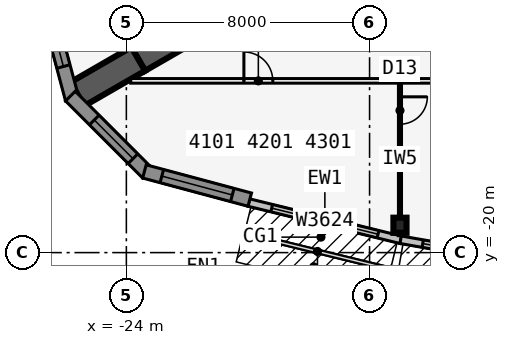
"""IFC4 building model, lengths in metres.
Left out: names, types, materials, properties, quantities, classifications, styles, units other than length and angle.
Written with IfcOpenShell. Run it as: python <this file> out.ifc"""

import sys

from ifc_helpers import new_model, si_unit, direction, frame, frame_2d, origin, origin_2d, place, context, subcontext, project, spatial, polyline, rectangle, i_section, outline, extrude, element, fill, save


model = new_model("IFC4")
c1 = context("Model", 3, precision=1e-05, world=origin(), true_north=direction((0.0, 1.0)))
c2 = subcontext(c1, "Body", "Model", "MODEL_VIEW")
j1 = project(units=[si_unit("LENGTHUNIT", "METRE"), si_unit("PLANEANGLEUNIT", "RADIAN")], contexts=[c1])
p1 = place(None, origin())
s1 = spatial("IfcSite", under=j1, at=p1, CompositionType="ELEMENT")
p2 = place(p1, origin())
s2 = spatial("IfcBuilding", under=s1, at=p2, CompositionType="ELEMENT")
p3 = place(p2, frame((0.0, 0.0, 155.5)))
s3 = spatial("IfcBuildingStorey", under=s2, at=p3, CompositionType="ELEMENT", Elevation=155.5)
for number, where, z_axis, x_axis in (
    (1, (-21.61, -12.477, 0.0), (0.0, 0.0, 1.0), (-0.866, -0.5, 0.0)),
    (2, (-23.61, -13.631, 0.0), (0.0, 0.0, 1.0), (-0.866, -0.5, 0.0)),
):
    element("IfcWall", number, at=place(p3, frame(where, z_axis=z_axis, x_axis=x_axis)), inside=s3, PredefinedType="SHEAR", context=c2, shape_type="SweptSolid", body=[
        extrude(rectangle(XDim=2.309, YDim=0.9, at=frame_2d((1.155, 0.0))), origin(), (0.0, 0.0, 1.0), 3.4),
    ])
p4 = place(p3, frame((-15.0, -19.1, 0.0), z_axis=(0.0, 0.0, 1.0), x_axis=(1.0, 0.0, 0.0)))
e3 = element("IfcColumn", 3, at=p4, inside=s3, PredefinedType="COLUMN", context=c2, shape_type="SweptSolid", body=[
    extrude(i_section(OverallWidth=0.432, OverallDepth=0.498, WebThickness=0.056, FlangeThickness=0.089, at=origin_2d()), origin(), (0.0, 0.0, 1.0), 3.4),
])
p5 = place(p3, frame((-19.97, -18.354, 0.0), z_axis=(0.0, 0.0, 1.0), x_axis=(0.971270024053, -0.237980126011, 0.0)))
e4 = element("IfcWall", 4, at=p5, inside=s3, PredefinedType="STANDARD", context=c2, shape_type="SweptSolid", body=[
    extrude(rectangle(XDim=5.148, YDim=0.25, at=frame_2d((2.574, 0.0))), origin(), (0.0, 0.0, 1.0), 3.235),
])
p6 = place(p5, frame((0.774, 0.0, 0.45)))
e5 = element("IfcOpeningElement", 5, at=p6, cuts=e4, PredefinedType="OPENING", context=c2, shape_type="SweptSolid", body=[
    extrude(rectangle(XDim=3.6, YDim=2.4, at=frame_2d((1.8, 1.2))), frame((0.0, 0.135, 0.0), z_axis=(0.0, -1.0, 0.0), x_axis=(1.0, 0.0, 0.0)), (0.0, 0.0, 1.0), 0.27),
])
p7 = place(p3, frame((-14.979, -19.577, 0.0), z_axis=(0.0, 0.0, 1.0), x_axis=(0.985030467156, -0.172380331752, 0.0)))
e6 = element("IfcWall", 6, at=p7, inside=s3, PredefinedType="STANDARD", context=c2, shape_type="SweptSolid", body=[
    extrude(rectangle(XDim=5.076, YDim=0.25, at=frame_2d((2.538, 0.0))), origin(), (0.0, 0.0, 1.0), 3.235),
])
p8 = place(p7, frame((0.738, 0.0, 0.45)))
e7 = element("IfcOpeningElement", 7, at=p8, cuts=e6, PredefinedType="OPENING", context=c2, shape_type="SweptSolid", body=[
    extrude(rectangle(XDim=3.6, YDim=2.4, at=frame_2d((1.8, 1.2))), frame((0.0, 0.135, 0.0), z_axis=(0.0, -1.0, 0.0), x_axis=(1.0, 0.0, 0.0)), (0.0, 0.0, 1.0), 0.27),
])
p9 = place(p3, frame((-26.711, -11.489, 0.0), z_axis=(0.0, 0.0, 1.0), x_axis=(0.258823421857, -0.965924653531, 0.0)))
e8 = element("IfcWall", 8, at=p9, inside=s3, PredefinedType="SOLIDWALL", context=c2, shape_type="SweptSolid", body=[
    extrude(outline(polyline([(3.586, 0.225), (3.527, 0.225), (3.035, 0.093), (3.0, 0.225), (0.0, 0.225), (0.0, -0.225), (3.586, -0.225), (3.586, 0.225)])), origin(), (0.0, 0.0, 1.0), 3.235),
])
p10 = place(p9, frame((0.675, 0.0, 0.45)))
e9 = element("IfcOpeningElement", 9, at=p10, cuts=e8, PredefinedType="OPENING", context=c2, shape_type="SweptSolid", body=[
    extrude(rectangle(XDim=1.8, YDim=2.4, at=frame_2d((0.9, 1.2))), frame((0.0, 0.235, 0.0), z_axis=(0.0, -1.0, 0.0), x_axis=(1.0, 0.0, 0.0)), (0.0, 0.0, 1.0), 0.47),
])
p11 = place(p3, frame((-25.841, -14.852, 0.0), z_axis=(0.0, 0.0, 1.0), x_axis=(0.707106781187, -0.707106781187, 0.0)))
e10 = element("IfcWall", 10, at=p11, inside=s3, PredefinedType="SOLIDWALL", context=c2, shape_type="SweptSolid", body=[
    extrude(outline(polyline([(3.586, 0.225), (0.586, 0.225), (0.551, 0.093), (0.059, 0.225), (0.0, 0.225), (0.0, -0.225), (3.586, -0.225), (3.586, 0.225)])), origin(), (0.0, 0.0, 1.0), 3.235),
])
p12 = place(p11, frame((1.111, 0.0, 0.45)))
e11 = element("IfcOpeningElement", 11, at=p12, cuts=e10, PredefinedType="OPENING", context=c2, shape_type="SweptSolid", body=[
    extrude(rectangle(XDim=1.8, YDim=2.4, at=frame_2d((0.9, 1.2))), frame((0.0, 0.235, 0.0), z_axis=(0.0, -1.0, 0.0), x_axis=(1.0, 0.0, 0.0)), (0.0, 0.0, 1.0), 0.47),
])
p13 = place(p3, frame((-23.406, -17.33, 0.0), z_axis=(0.0, 0.0, 1.0), x_axis=(0.965924653531, -0.258823421857, 0.0)))
e12 = element("IfcWall", 12, at=p13, inside=s3, PredefinedType="SOLIDWALL", context=c2, shape_type="SweptSolid", body=[
    extrude(rectangle(XDim=3.586, YDim=0.45, at=frame_2d((1.793, 0.0))), origin(), (0.0, 0.0, 1.0), 3.235),
])
p14 = place(p13, frame((0.593, 0.0, 0.45)))
e13 = element("IfcOpeningElement", 13, at=p14, cuts=e12, PredefinedType="OPENING", context=c2, shape_type="SweptSolid", body=[
    extrude(rectangle(XDim=2.4, YDim=2.4, at=frame_2d((1.2, 1.2))), frame((0.0, 0.235, 0.0), z_axis=(0.0, -1.0, 0.0), x_axis=(1.0, 0.0, 0.0)), (0.0, 0.0, 1.0), 0.47),
])
p15 = place(p3, frame((-23.857, -14.351, 0.0), z_axis=(0.0, 0.0, 1.0), x_axis=(1.0, 0.0, 0.0)))
e14 = element("IfcWall", 14, at=p15, inside=s3, PredefinedType="PARTITIONING", context=c2, shape_type="SweptSolid", body=[
    extrude(rectangle(XDim=47.714, YDim=0.15, at=frame_2d((23.857, 0.0))), origin(), (0.0, 0.0, 1.0), 3.235),
])
p16 = place(p15, frame((3.723, 0.0, 0.0)))
e15 = element("IfcOpeningElement", 15, at=p16, cuts=e14, PredefinedType="OPENING", context=c2, shape_type="SweptSolid", body=[
    extrude(rectangle(XDim=0.95, YDim=2.13, at=frame_2d((0.475, 1.065))), frame((0.0, 0.085, 0.0), z_axis=(0.0, -1.0, 0.0), x_axis=(1.0, 0.0, 0.0)), (0.0, 0.0, 1.0), 0.17),
])
p17 = place(p15, frame((17.082, 0.0, 0.0)))
e16 = element("IfcOpeningElement", 16, at=p17, cuts=e14, PredefinedType="OPENING", context=c2, shape_type="SweptSolid", body=[
    extrude(rectangle(XDim=0.95, YDim=2.13, at=frame_2d((0.475, 1.065))), frame((0.0, 0.085, 0.0), z_axis=(0.0, -1.0, 0.0), x_axis=(1.0, 0.0, 0.0)), (0.0, 0.0, 1.0), 0.17),
])
p18 = place(p15, frame((25.857, 0.0, 0.0)))
e17 = element("IfcOpeningElement", 17, at=p18, cuts=e14, PredefinedType="OPENING", context=c2, shape_type="SweptSolid", body=[
    extrude(rectangle(XDim=1.0, YDim=2.13, at=frame_2d((0.5, 1.065))), frame((0.0, 0.085, 0.0), z_axis=(0.0, -1.0, 0.0), x_axis=(1.0, 0.0, 0.0)), (0.0, 0.0, 1.0), 0.17),
])
p19 = place(p15, frame((30.282, 0.0, 0.0)))
e18 = element("IfcOpeningElement", 18, at=p19, cuts=e14, PredefinedType="OPENING", context=c2, shape_type="SweptSolid", body=[
    extrude(rectangle(XDim=0.95, YDim=2.13, at=frame_2d((0.475, 1.065))), frame((0.0, 0.085, 0.0), z_axis=(0.0, -1.0, 0.0), x_axis=(1.0, 0.0, 0.0)), (0.0, 0.0, 1.0), 0.17),
])
p20 = place(p15, frame((43.041, 0.0, 0.0)))
e19 = element("IfcOpeningElement", 19, at=p20, cuts=e14, PredefinedType="OPENING", context=c2, shape_type="SweptSolid", body=[
    extrude(rectangle(XDim=0.95, YDim=2.13, at=frame_2d((0.475, 1.065))), frame((0.0, 0.085, 0.0), z_axis=(0.0, -1.0, 0.0), x_axis=(1.0, 0.0, 0.0)), (0.0, 0.0, 1.0), 0.17),
])
p21 = place(p3, frame((-15.0, -14.426, 0.0), z_axis=(0.0, 0.0, 1.0), x_axis=(0.0, -1.0, 0.0)))
e20 = element("IfcWall", 20, at=p21, inside=s3, PredefinedType="PARTITIONING", context=c2, shape_type="SweptSolid", body=[
    extrude(rectangle(XDim=5.017, YDim=0.1, at=frame_2d((2.508, 0.0))), origin(), (0.0, 0.0, 1.0), 2.389),
])
p22 = place(p21, frame((0.45, 0.0, 0.0)))
e21 = element("IfcOpeningElement", 21, at=p22, cuts=e20, PredefinedType="OPENING", context=c2, shape_type="SweptSolid", body=[
    extrude(rectangle(XDim=0.9, YDim=2.13, at=frame_2d((0.45, 1.065))), frame((0.0, 0.06, 0.0), z_axis=(0.0, -1.0, 0.0), x_axis=(1.0, 0.0, 0.0)), (0.0, 0.0, 1.0), 0.12),
])
p23 = place(p6, origin())
e22 = element("IfcWindow", 22, at=p23, inside=s3, PartitioningType="SINGLE_PANEL", PredefinedType="WINDOW", context=c2, shape_type="SweptSolid", body=[
    extrude(rectangle(XDim=3.6, YDim=2.4, at=frame_2d((1.8, 1.2))), frame((0.0, 0.03, 0.0), z_axis=(0.0, -1.0, 0.0), x_axis=(1.0, 0.0, 0.0)), (0.0, 0.0, 1.0), 0.06),
])
fill(e5, e22)
p24 = place(p8, origin())
e23 = element("IfcWindow", 23, at=p24, inside=s3, PartitioningType="SINGLE_PANEL", PredefinedType="WINDOW", context=c2, shape_type="SweptSolid", body=[
    extrude(rectangle(XDim=3.6, YDim=2.4, at=frame_2d((1.8, 1.2))), frame((0.0, 0.03, 0.0), z_axis=(0.0, -1.0, 0.0), x_axis=(1.0, 0.0, 0.0)), (0.0, 0.0, 1.0), 0.06),
])
fill(e7, e23)
p25 = place(p10, origin())
e24 = element("IfcWindow", 24, at=p25, inside=s3, PartitioningType="SINGLE_PANEL", PredefinedType="WINDOW", context=c2, shape_type="SweptSolid", body=[
    extrude(rectangle(XDim=1.8, YDim=2.4, at=frame_2d((0.9, 1.2))), frame((0.0, 0.03, 0.0), z_axis=(0.0, -1.0, 0.0), x_axis=(1.0, 0.0, 0.0)), (0.0, 0.0, 1.0), 0.06),
])
fill(e9, e24)
p26 = place(p12, origin())
e25 = element("IfcWindow", 25, at=p26, inside=s3, PartitioningType="SINGLE_PANEL", PredefinedType="WINDOW", context=c2, shape_type="SweptSolid", body=[
    extrude(rectangle(XDim=1.8, YDim=2.4, at=frame_2d((0.9, 1.2))), frame((0.0, 0.03, 0.0), z_axis=(0.0, -1.0, 0.0), x_axis=(1.0, 0.0, 0.0)), (0.0, 0.0, 1.0), 0.06),
])
fill(e11, e25)
p27 = place(p14, origin())
e26 = element("IfcWindow", 26, at=p27, inside=s3, PartitioningType="SINGLE_PANEL", PredefinedType="WINDOW", context=c2, shape_type="SweptSolid", body=[
    extrude(rectangle(XDim=2.4, YDim=2.4, at=frame_2d((1.2, 1.2))), frame((0.0, 0.03, 0.0), z_axis=(0.0, -1.0, 0.0), x_axis=(1.0, 0.0, 0.0)), (0.0, 0.0, 1.0), 0.06),
])
fill(e13, e26)
p28 = place(p22, origin())
e27 = element("IfcDoor", 27, at=p28, inside=s3, OperationType="SINGLE_SWING_LEFT", PredefinedType="DOOR", context=c2, shape_type="SweptSolid", body=[
    extrude(rectangle(XDim=0.9, YDim=2.13, at=frame_2d((0.45, 1.065))), frame((0.0, 0.025, 0.0), z_axis=(0.0, -1.0, 0.0), x_axis=(1.0, 0.0, 0.0)), (0.0, 0.0, 1.0), 0.05),
])
fill(e21, e27)
p29 = place(p16, origin())
e28 = element("IfcDoor", 28, at=p29, inside=s3, OperationType="SINGLE_SWING_LEFT", PredefinedType="DOOR", context=c2, shape_type="SweptSolid", body=[
    extrude(rectangle(XDim=0.95, YDim=2.13, at=frame_2d((0.475, 1.065))), frame((0.0, 0.025, 0.0), z_axis=(0.0, -1.0, 0.0), x_axis=(1.0, 0.0, 0.0)), (0.0, 0.0, 1.0), 0.05),
])
fill(e15, e28)
save(model, sys.argv[1])
